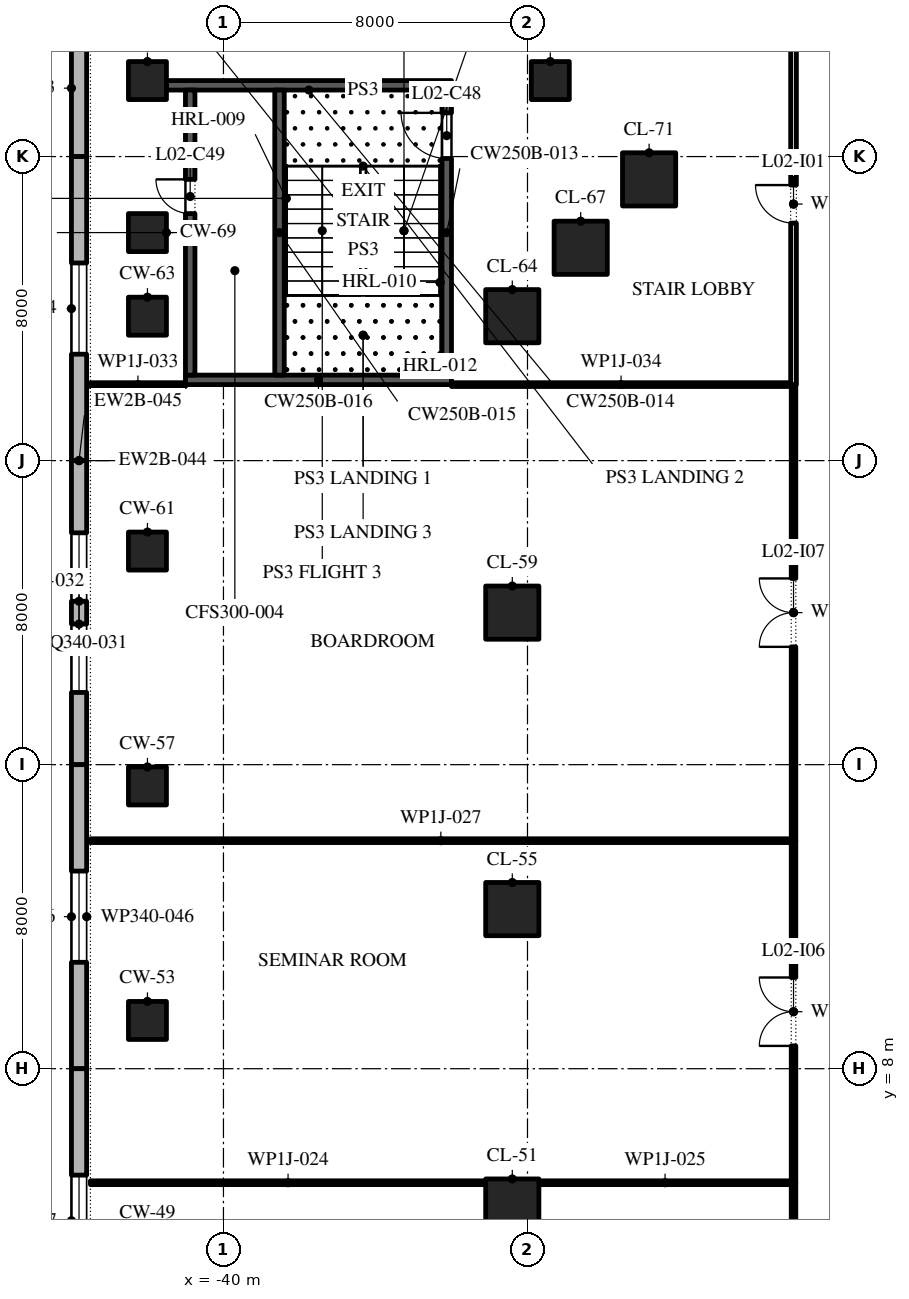
"""IFC4 building model, lengths in metres.
Left out: names, types, materials, properties, quantities, classifications, styles, units other than length and angle.
Written with IfcOpenShell. Run it as: python <this file> out.ifc"""

import sys

from ifc_helpers import new_model, si_unit, direction, frame, frame_2d, origin, origin_2d, place, context, subcontext, project, spatial, polyline, rectangle, outline, extrude, element, fill, save


model = new_model("IFC4")
c1 = context("Model", 3, precision=1e-05, world=origin(), true_north=direction((0.0, 1.0)))
c2 = subcontext(c1, "Body", "Model", "MODEL_VIEW")
j1 = project(units=[si_unit("LENGTHUNIT", "METRE"), si_unit("PLANEANGLEUNIT", "RADIAN")], contexts=[c1])
p1 = place(None, origin())
s1 = spatial("IfcSite", under=j1, at=p1, CompositionType="ELEMENT")
p2 = place(p1, origin())
s2 = spatial("IfcBuilding", under=s1, at=p2, CompositionType="ELEMENT")
p3 = place(p2, frame((0.0, 0.0, 14.0)))
s3 = spatial("IfcBuildingStorey", under=s2, at=p3, CompositionType="ELEMENT", Elevation=14.0)
p4 = place(p3, frame((-32.4, 4.4, 0.0), z_axis=(0.0, 0.0, 1.0), x_axis=(1.0, 0.0, 0.0)))
e1 = element("IfcColumn", 1, at=p4, inside=s3, PredefinedType="COLUMN", context=c2, shape_type="SweptSolid", body=[
    extrude(rectangle(XDim=1.4, YDim=1.4, at=origin_2d()), origin(), (0.0, 0.0, 1.0), 5.2),
])
p5 = place(p3, frame((-42.0, 9.27, 0.0), z_axis=(0.0, 0.0, 1.0), x_axis=(1.0, 0.0, 0.0)))
e2 = element("IfcColumn", 2, at=p5, inside=s3, PredefinedType="COLUMN", context=c2, shape_type="SweptSolid", body=[
    extrude(rectangle(XDim=1.0, YDim=1.0, at=origin_2d()), origin(), (0.0, 0.0, 1.0), 5.2),
])
p6 = place(p3, frame((-32.4, 12.2, 0.0), z_axis=(0.0, 0.0, 1.0), x_axis=(1.0, 0.0, 0.0)))
e3 = element("IfcColumn", 3, at=p6, inside=s3, PredefinedType="COLUMN", context=c2, shape_type="SweptSolid", body=[
    extrude(rectangle(XDim=1.4, YDim=1.4, at=origin_2d()), origin(), (0.0, 0.0, 1.0), 5.2),
])
p7 = place(p3, frame((-42.0, 15.44, 0.0), z_axis=(0.0, 0.0, 1.0), x_axis=(1.0, 0.0, 0.0)))
e4 = element("IfcColumn", 4, at=p7, inside=s3, PredefinedType="COLUMN", context=c2, shape_type="SweptSolid", body=[
    extrude(rectangle(XDim=1.0, YDim=1.0, at=origin_2d()), origin(), (0.0, 0.0, 1.0), 5.2),
])
p8 = place(p3, frame((-32.4, 20.0, 0.0), z_axis=(0.0, 0.0, 1.0), x_axis=(1.0, 0.0, 0.0)))
e5 = element("IfcColumn", 5, at=p8, inside=s3, PredefinedType="COLUMN", context=c2, shape_type="SweptSolid", body=[
    extrude(rectangle(XDim=1.4, YDim=1.4, at=origin_2d()), origin(), (0.0, 0.0, 1.0), 5.2),
])
for number, where, z_axis, x_axis in (
    (6, (-42.0, 21.62, 0.0), (0.0, 0.0, 1.0), (1.0, 0.0, 0.0)),
    (7, (-42.0, 27.8, 0.0), (0.0, 0.0, 1.0), (1.0, 0.0, 0.0)),
):
    element("IfcColumn", number, at=place(p3, frame(where, z_axis=z_axis, x_axis=x_axis)), inside=s3, PredefinedType="COLUMN", context=c2, shape_type="SweptSolid", body=[
        extrude(rectangle(XDim=1.0, YDim=1.0, at=origin_2d()), origin(), (0.0, 0.0, 1.0), 5.2),
    ])
for number, where, z_axis, x_axis in (
    (8, (-32.4, 27.8, 0.0), (0.0, 0.0, 1.0), (1.0, 0.0, 0.0)),
    (9, (-30.6, 29.6, 0.0), (0.0, 0.0, 1.0), (1.0, 0.0, 0.0)),
):
    element("IfcColumn", number, at=place(p3, frame(where, z_axis=z_axis, x_axis=x_axis)), inside=s3, PredefinedType="COLUMN", context=c2, shape_type="SweptSolid", body=[
        extrude(rectangle(XDim=1.4, YDim=1.4, at=origin_2d()), origin(), (0.0, 0.0, 1.0), 5.2),
    ])
p9 = place(p3, frame((-42.0, 30.0, 0.0), z_axis=(0.0, 0.0, 1.0), x_axis=(1.0, 0.0, 0.0)))
e10 = element("IfcColumn", 10, at=p9, inside=s3, PredefinedType="COLUMN", context=c2, shape_type="SweptSolid", body=[
    extrude(rectangle(XDim=1.0, YDim=1.0, at=origin_2d()), origin(), (0.0, 0.0, 1.0), 5.2),
])
p10 = place(p3, frame((-28.8, 31.4, 0.0), z_axis=(0.0, 0.0, 1.0), x_axis=(1.0, 0.0, 0.0)))
e11 = element("IfcColumn", 11, at=p10, inside=s3, PredefinedType="COLUMN", context=c2, shape_type="SweptSolid", body=[
    extrude(rectangle(XDim=1.4, YDim=1.4, at=origin_2d()), origin(), (0.0, 0.0, 1.0), 5.2),
])
for number, where, z_axis, x_axis in (
    (12, (-42.0, 34.0, 0.0), (0.0, 0.0, 1.0), (1.0, 0.0, 0.0)),
    (13, (-31.4, 34.0, 0.0), (0.0, 0.0, 1.0), (1.0, 0.0, 0.0)),
):
    element("IfcColumn", number, at=place(p3, frame(where, z_axis=z_axis, x_axis=x_axis)), inside=s3, PredefinedType="COLUMN", context=c2, shape_type="SweptSolid", body=[
        extrude(rectangle(XDim=1.0, YDim=1.0, at=origin_2d()), origin(), (0.0, 0.0, 1.0), 5.2),
    ])
p11 = place(p3, frame((-43.8, 35.6, 0.0), z_axis=(0.0, 0.0, 1.0), x_axis=(0.0, -1.0, 0.0)))
e14 = element("IfcWall", 14, at=p11, inside=s3, PredefinedType="STANDARD", context=c2, shape_type="SweptSolid", body=[
    extrude(rectangle(XDim=3.6, YDim=0.4, at=frame_2d((1.8, 0.0))), origin(), (0.0, 0.0, 1.0), 4.9),
])
p12 = place(p3, frame((-43.8, 32.0, 0.0), z_axis=(0.0, 0.0, 1.0), x_axis=(0.0, -1.0, 0.0)))
e15 = element("IfcWall", 15, at=p12, inside=s3, PredefinedType="STANDARD", context=c2, shape_type="SweptSolid", body=[
    extrude(rectangle(XDim=8.0, YDim=0.4, at=frame_2d((4.0, 0.0))), origin(), (0.0, 0.0, 1.0), 4.9),
])
p13 = place(p12, frame((2.8, 0.0, 0.9)))
e16 = element("IfcOpeningElement", 16, at=p13, cuts=e15, PredefinedType="OPENING", context=c2, shape_type="SweptSolid", body=[
    extrude(outline(polyline([(0.0, 0.0), (2.4, 0.0), (2.4, 1.7), (2.379, 1.976), (2.315, 2.246), (2.212, 2.502), (2.07, 2.74), (1.893, 2.954), (1.686, 3.137), (1.453, 3.287), (1.2, 3.4), (0.947, 3.287), (0.714, 3.137), (0.507, 2.954), (0.33, 2.74), (0.188, 2.502), (0.084, 2.246), (0.021, 1.976), (0.0, 1.7), (0.0, 0.0)])), frame((0.0, 0.21, 0.0), z_axis=(0.0, -1.0, 0.0), x_axis=(1.0, 0.0, 0.0)), (0.0, 0.0, 1.0), 0.42),
])
p14 = place(p3, frame((-43.8, 24.0, 0.0), z_axis=(0.0, 0.0, 1.0), x_axis=(0.0, -1.0, 0.0)))
e17 = element("IfcWall", 17, at=p14, inside=s3, PredefinedType="STANDARD", context=c2, shape_type="SweptSolid", body=[
    extrude(rectangle(XDim=8.0, YDim=0.4, at=frame_2d((4.0, 0.0))), origin(), (0.0, 0.0, 1.0), 4.9),
])
p15 = place(p14, frame((1.9, 0.0, 0.9)))
e18 = element("IfcOpeningElement", 18, at=p15, cuts=e17, PredefinedType="OPENING", context=c2, shape_type="SweptSolid", body=[
    extrude(outline(polyline([(0.0, 0.0), (1.8, 0.0), (1.8, 1.841), (1.785, 2.076), (1.739, 2.307), (1.663, 2.53), (1.559, 2.741), (1.428, 2.937), (1.273, 3.114), (1.096, 3.269), (0.9, 3.4), (0.704, 3.269), (0.527, 3.114), (0.372, 2.937), (0.241, 2.741), (0.137, 2.53), (0.061, 2.307), (0.015, 2.076), (0.0, 1.841), (0.0, 0.0)])), frame((0.0, 0.21, 0.0), z_axis=(0.0, -1.0, 0.0), x_axis=(1.0, 0.0, 0.0)), (0.0, 0.0, 1.0), 0.42),
])
p16 = place(p14, frame((4.3, 0.0, 0.9)))
e19 = element("IfcOpeningElement", 19, at=p16, cuts=e17, PredefinedType="OPENING", context=c2, shape_type="SweptSolid", body=[
    extrude(outline(polyline([(0.0, 0.0), (1.8, 0.0), (1.8, 1.841), (1.785, 2.076), (1.739, 2.307), (1.663, 2.53), (1.559, 2.741), (1.428, 2.937), (1.273, 3.114), (1.096, 3.269), (0.9, 3.4), (0.704, 3.269), (0.527, 3.114), (0.372, 2.937), (0.241, 2.741), (0.137, 2.53), (0.061, 2.307), (0.015, 2.076), (0.0, 1.841), (0.0, 0.0)])), frame((0.0, 0.21, 0.0), z_axis=(0.0, -1.0, 0.0), x_axis=(1.0, 0.0, 0.0)), (0.0, 0.0, 1.0), 0.42),
])
p17 = place(p3, frame((-43.8, 16.0, 0.0), z_axis=(0.0, 0.0, 1.0), x_axis=(0.0, -1.0, 0.0)))
e20 = element("IfcWall", 20, at=p17, inside=s3, PredefinedType="STANDARD", context=c2, shape_type="SweptSolid", body=[
    extrude(rectangle(XDim=8.0, YDim=0.4, at=frame_2d((4.0, 0.0))), origin(), (0.0, 0.0, 1.0), 4.9),
])
p18 = place(p17, frame((2.8, 0.0, 0.9)))
e21 = element("IfcOpeningElement", 21, at=p18, cuts=e20, PredefinedType="OPENING", context=c2, shape_type="SweptSolid", body=[
    extrude(outline(polyline([(0.0, 0.0), (2.4, 0.0), (2.4, 1.7), (2.379, 1.976), (2.315, 2.246), (2.212, 2.502), (2.07, 2.74), (1.893, 2.954), (1.686, 3.137), (1.453, 3.287), (1.2, 3.4), (0.947, 3.287), (0.714, 3.137), (0.507, 2.954), (0.33, 2.74), (0.188, 2.502), (0.084, 2.246), (0.021, 1.976), (0.0, 1.7), (0.0, 0.0)])), frame((0.0, 0.21, 0.0), z_axis=(0.0, -1.0, 0.0), x_axis=(1.0, 0.0, 0.0)), (0.0, 0.0, 1.0), 0.42),
])
p19 = place(p3, frame((-43.8, 8.0, 0.0), z_axis=(0.0, 0.0, 1.0), x_axis=(0.0, -1.0, 0.0)))
e22 = element("IfcWall", 22, at=p19, inside=s3, PredefinedType="STANDARD", context=c2, shape_type="SweptSolid", body=[
    extrude(rectangle(XDim=8.0, YDim=0.4, at=frame_2d((4.0, 0.0))), origin(), (0.0, 0.0, 1.0), 4.9),
])
p20 = place(p19, frame((2.8, 0.0, 0.9)))
e23 = element("IfcOpeningElement", 23, at=p20, cuts=e22, PredefinedType="OPENING", context=c2, shape_type="SweptSolid", body=[
    extrude(outline(polyline([(0.0, 0.0), (2.4, 0.0), (2.4, 1.7), (2.379, 1.976), (2.315, 2.246), (2.212, 2.502), (2.07, 2.74), (1.893, 2.954), (1.686, 3.137), (1.453, 3.287), (1.2, 3.4), (0.947, 3.287), (0.714, 3.137), (0.507, 2.954), (0.33, 2.74), (0.188, 2.502), (0.084, 2.246), (0.021, 1.976), (0.0, 1.7), (0.0, 0.0)])), frame((0.0, 0.21, 0.0), z_axis=(0.0, -1.0, 0.0), x_axis=(1.0, 0.0, 0.0)), (0.0, 0.0, 1.0), 0.42),
])
p21 = place(p3, frame((-41.0, 26.125, 0.0), z_axis=(0.0, 0.0, 1.0), x_axis=(1.0, 0.0, 0.0)))
e24 = element("IfcWall", 24, at=p21, inside=s3, PredefinedType="SHEAR", context=c2, shape_type="SweptSolid", body=[
    extrude(rectangle(XDim=7.0, YDim=0.25, at=frame_2d((3.5, 0.0))), origin(), (0.0, 0.0, 1.0), 4.9),
])
p22 = place(p3, frame((-41.5, 33.875, 0.0), z_axis=(0.0, 0.0, 1.0), x_axis=(1.0, 0.0, 0.0)))
e25 = element("IfcWall", 25, at=p22, inside=s3, PredefinedType="SHEAR", context=c2, shape_type="SweptSolid", body=[
    extrude(rectangle(XDim=7.5, YDim=0.25, at=frame_2d((3.75, 0.0))), origin(), (0.0, 0.0, 1.0), 4.9),
])
p23 = place(p3, frame((-40.875, 26.25, 0.0), z_axis=(0.0, 0.0, 1.0), x_axis=(0.0, 1.0, 0.0)))
e26 = element("IfcWall", 26, at=p23, inside=s3, PredefinedType="SHEAR", context=c2, shape_type="SweptSolid", body=[
    extrude(rectangle(XDim=7.5, YDim=0.25, at=frame_2d((3.75, 0.0))), origin(), (0.0, 0.0, 1.0), 4.9),
])
p24 = place(p23, frame((4.25, 0.0, 0.0)))
e27 = element("IfcOpeningElement", 27, at=p24, cuts=e26, PredefinedType="OPENING", context=c2, shape_type="SweptSolid", body=[
    extrude(rectangle(XDim=0.9, YDim=2.1, at=frame_2d((0.45, 1.05))), frame((0.0, 0.135, 0.0), z_axis=(0.0, -1.0, 0.0), x_axis=(1.0, 0.0, 0.0)), (0.0, 0.0, 1.0), 0.27),
])
p25 = place(p3, frame((-34.125, 26.25, 0.0), z_axis=(0.0, 0.0, 1.0), x_axis=(0.0, 1.0, 0.0)))
e28 = element("IfcWall", 28, at=p25, inside=s3, PredefinedType="SHEAR", context=c2, shape_type="SweptSolid", body=[
    extrude(rectangle(XDim=7.5, YDim=0.25, at=frame_2d((3.75, 0.0))), origin(), (0.0, 0.0, 1.0), 4.9),
])
p26 = place(p25, frame((5.7, 0.0, 0.0)))
e29 = element("IfcOpeningElement", 29, at=p26, cuts=e28, PredefinedType="OPENING", context=c2, shape_type="SweptSolid", body=[
    extrude(rectangle(XDim=1.2, YDim=2.1, at=frame_2d((0.6, 1.05))), frame((0.0, 0.135, 0.0), z_axis=(0.0, -1.0, 0.0), x_axis=(1.0, 0.0, 0.0)), (0.0, 0.0, 1.0), 0.27),
])
p27 = place(p3, frame((-38.525, 26.25, 0.0), z_axis=(0.0, 0.0, 1.0), x_axis=(0.0, 1.0, 0.0)))
e30 = element("IfcWall", 30, at=p27, inside=s3, PredefinedType="SHEAR", context=c2, shape_type="SweptSolid", body=[
    extrude(rectangle(XDim=7.5, YDim=0.25, at=frame_2d((3.75, 0.0))), origin(), (0.0, 0.0, 1.0), 4.9),
])
p28 = place(p3, frame((-43.5, 5.0, 0.0), z_axis=(0.0, 0.0, 1.0), x_axis=(1.0, 0.0, 0.0)))
e31 = element("IfcWall", 31, at=p28, inside=s3, PredefinedType="PARTITIONING", context=c2, shape_type="SweptSolid", body=[
    extrude(rectangle(XDim=10.4, YDim=0.1, at=frame_2d((5.2, 0.0))), origin(), (0.0, 0.0, 1.0), 4.9),
])
p29 = place(p3, frame((-31.7, 5.0, 0.0), z_axis=(0.0, 0.0, 1.0), x_axis=(1.0, 0.0, 0.0)))
e32 = element("IfcWall", 32, at=p29, inside=s3, PredefinedType="PARTITIONING", context=c2, shape_type="SweptSolid", body=[
    extrude(rectangle(XDim=6.64, YDim=0.1, at=frame_2d((3.32, 0.0))), origin(), (0.0, 0.0, 1.0), 4.9),
])
p30 = place(p3, frame((-43.5, 14.0, 0.0), z_axis=(0.0, 0.0, 1.0), x_axis=(1.0, 0.0, 0.0)))
e33 = element("IfcWall", 33, at=p30, inside=s3, PredefinedType="PARTITIONING", context=c2, shape_type="SweptSolid", body=[
    extrude(rectangle(XDim=18.44, YDim=0.1, at=frame_2d((9.22, 0.0))), origin(), (0.0, 0.0, 1.0), 4.9),
])
p31 = place(p3, frame((-43.5, 26.0, 0.0), z_axis=(0.0, 0.0, 1.0), x_axis=(1.0, 0.0, 0.0)))
e34 = element("IfcWall", 34, at=p31, inside=s3, PredefinedType="PARTITIONING", context=c2, shape_type="SweptSolid", body=[
    extrude(rectangle(XDim=2.5, YDim=0.1, at=frame_2d((1.25, 0.0))), origin(), (0.0, 0.0, 1.0), 4.9),
])
p32 = place(p3, frame((-34.0, 26.0, 0.0), z_axis=(0.0, 0.0, 1.0), x_axis=(1.0, 0.0, 0.0)))
e35 = element("IfcWall", 35, at=p32, inside=s3, PredefinedType="PARTITIONING", context=c2, shape_type="SweptSolid", body=[
    extrude(rectangle(XDim=8.925, YDim=0.1, at=frame_2d((4.462, 0.0))), origin(), (0.0, 0.0, 1.0), 4.9),
])
p33 = place(p3, frame((-25.0, -6.0, 0.0), z_axis=(0.0, 0.0, 1.0), x_axis=(0.0, 1.0, 0.0)))
e36 = element("IfcWall", 36, at=p33, inside=s3, PredefinedType="PARTITIONING", context=c2, shape_type="SweptSolid", body=[
    extrude(rectangle(XDim=11.0, YDim=0.12, at=frame_2d((5.5, 0.0))), origin(), (0.0, 0.0, 1.0), 4.9),
])
p34 = place(p33, frame((4.6, 0.0, 0.0)))
e37 = element("IfcOpeningElement", 37, at=p34, cuts=e36, PredefinedType="OPENING", context=c2, shape_type="SweptSolid", body=[
    extrude(rectangle(XDim=1.8, YDim=2.1, at=frame_2d((0.9, 1.05))), frame((0.0, 0.07, 0.0), z_axis=(0.0, -1.0, 0.0), x_axis=(1.0, 0.0, 0.0)), (0.0, 0.0, 1.0), 0.14),
])
p35 = place(p3, frame((-25.0, 5.0, 0.0), z_axis=(0.0, 0.0, 1.0), x_axis=(0.0, 1.0, 0.0)))
e38 = element("IfcWall", 38, at=p35, inside=s3, PredefinedType="PARTITIONING", context=c2, shape_type="SweptSolid", body=[
    extrude(rectangle(XDim=9.0, YDim=0.12, at=frame_2d((4.5, 0.0))), origin(), (0.0, 0.0, 1.0), 4.9),
])
p36 = place(p35, frame((3.6, 0.0, 0.0)))
e39 = element("IfcOpeningElement", 39, at=p36, cuts=e38, PredefinedType="OPENING", context=c2, shape_type="SweptSolid", body=[
    extrude(rectangle(XDim=1.8, YDim=2.1, at=frame_2d((0.9, 1.05))), frame((0.0, 0.07, 0.0), z_axis=(0.0, -1.0, 0.0), x_axis=(1.0, 0.0, 0.0)), (0.0, 0.0, 1.0), 0.14),
])
p37 = place(p3, frame((-25.0, 14.0, 0.0), z_axis=(0.0, 0.0, 1.0), x_axis=(0.0, 1.0, 0.0)))
e40 = element("IfcWall", 40, at=p37, inside=s3, PredefinedType="PARTITIONING", context=c2, shape_type="SweptSolid", body=[
    extrude(rectangle(XDim=12.0, YDim=0.12, at=frame_2d((6.0, 0.0))), origin(), (0.0, 0.0, 1.0), 4.9),
])
p38 = place(p37, frame((5.1, 0.0, 0.0)))
e41 = element("IfcOpeningElement", 41, at=p38, cuts=e40, PredefinedType="OPENING", context=c2, shape_type="SweptSolid", body=[
    extrude(rectangle(XDim=1.8, YDim=2.1, at=frame_2d((0.9, 1.05))), frame((0.0, 0.07, 0.0), z_axis=(0.0, -1.0, 0.0), x_axis=(1.0, 0.0, 0.0)), (0.0, 0.0, 1.0), 0.14),
])
p39 = place(p3, frame((-25.0, 26.0, 0.0), z_axis=(0.0, 0.0, 1.0), x_axis=(0.0, 1.0, 0.0)))
e42 = element("IfcWall", 42, at=p39, inside=s3, PredefinedType="PARTITIONING", context=c2, shape_type="SweptSolid", body=[
    extrude(rectangle(XDim=9.5, YDim=0.15, at=frame_2d((4.75, 0.0))), origin(), (0.0, 0.0, 1.0), 4.9),
])
p40 = place(p39, frame((4.25, 0.0, 0.0)))
e43 = element("IfcOpeningElement", 43, at=p40, cuts=e42, PredefinedType="OPENING", context=c2, shape_type="SweptSolid", body=[
    extrude(rectangle(XDim=1.0, YDim=2.1, at=frame_2d((0.5, 1.05))), frame((0.0, 0.085, 0.0), z_axis=(0.0, -1.0, 0.0), x_axis=(1.0, 0.0, 0.0)), (0.0, 0.0, 1.0), 0.17),
])
p41 = place(p13, origin())
e44 = element("IfcWindow", 44, at=p41, inside=s3, PartitioningType="DOUBLE_PANEL_VERTICAL", PredefinedType="WINDOW", context=c2, shape_type="SweptSolid", body=[
    extrude(outline(polyline([(0.0, 0.0), (2.4, 0.0), (2.4, 1.7), (2.379, 1.976), (2.315, 2.246), (2.212, 2.502), (2.07, 2.74), (1.893, 2.954), (1.686, 3.137), (1.453, 3.287), (1.2, 3.4), (0.947, 3.287), (0.714, 3.137), (0.507, 2.954), (0.33, 2.74), (0.188, 2.502), (0.084, 2.246), (0.021, 1.976), (0.0, 1.7), (0.0, 0.0)])), frame((0.0, 0.03, 0.0), z_axis=(0.0, -1.0, 0.0), x_axis=(1.0, 0.0, 0.0)), (0.0, 0.0, 1.0), 0.06),
])
fill(e16, e44)
p42 = place(p15, origin())
e45 = element("IfcWindow", 45, at=p42, inside=s3, PartitioningType="DOUBLE_PANEL_VERTICAL", PredefinedType="WINDOW", context=c2, shape_type="SweptSolid", body=[
    extrude(outline(polyline([(0.0, 0.0), (1.8, 0.0), (1.8, 1.841), (1.785, 2.076), (1.739, 2.307), (1.663, 2.53), (1.559, 2.741), (1.428, 2.937), (1.273, 3.114), (1.096, 3.269), (0.9, 3.4), (0.704, 3.269), (0.527, 3.114), (0.372, 2.937), (0.241, 2.741), (0.137, 2.53), (0.061, 2.307), (0.015, 2.076), (0.0, 1.841), (0.0, 0.0)])), frame((0.0, 0.03, 0.0), z_axis=(0.0, -1.0, 0.0), x_axis=(1.0, 0.0, 0.0)), (0.0, 0.0, 1.0), 0.06),
])
fill(e18, e45)
p43 = place(p16, origin())
e46 = element("IfcWindow", 46, at=p43, inside=s3, PartitioningType="DOUBLE_PANEL_VERTICAL", PredefinedType="WINDOW", context=c2, shape_type="SweptSolid", body=[
    extrude(outline(polyline([(0.0, 0.0), (1.8, 0.0), (1.8, 1.841), (1.785, 2.076), (1.739, 2.307), (1.663, 2.53), (1.559, 2.741), (1.428, 2.937), (1.273, 3.114), (1.096, 3.269), (0.9, 3.4), (0.704, 3.269), (0.527, 3.114), (0.372, 2.937), (0.241, 2.741), (0.137, 2.53), (0.061, 2.307), (0.015, 2.076), (0.0, 1.841), (0.0, 0.0)])), frame((0.0, 0.03, 0.0), z_axis=(0.0, -1.0, 0.0), x_axis=(1.0, 0.0, 0.0)), (0.0, 0.0, 1.0), 0.06),
])
fill(e19, e46)
p44 = place(p18, origin())
e47 = element("IfcWindow", 47, at=p44, inside=s3, PartitioningType="DOUBLE_PANEL_VERTICAL", PredefinedType="WINDOW", context=c2, shape_type="SweptSolid", body=[
    extrude(outline(polyline([(0.0, 0.0), (2.4, 0.0), (2.4, 1.7), (2.379, 1.976), (2.315, 2.246), (2.212, 2.502), (2.07, 2.74), (1.893, 2.954), (1.686, 3.137), (1.453, 3.287), (1.2, 3.4), (0.947, 3.287), (0.714, 3.137), (0.507, 2.954), (0.33, 2.74), (0.188, 2.502), (0.084, 2.246), (0.021, 1.976), (0.0, 1.7), (0.0, 0.0)])), frame((0.0, 0.03, 0.0), z_axis=(0.0, -1.0, 0.0), x_axis=(1.0, 0.0, 0.0)), (0.0, 0.0, 1.0), 0.06),
])
fill(e21, e47)
p45 = place(p20, origin())
e48 = element("IfcWindow", 48, at=p45, inside=s3, PartitioningType="DOUBLE_PANEL_VERTICAL", PredefinedType="WINDOW", context=c2, shape_type="SweptSolid", body=[
    extrude(outline(polyline([(0.0, 0.0), (2.4, 0.0), (2.4, 1.7), (2.379, 1.976), (2.315, 2.246), (2.212, 2.502), (2.07, 2.74), (1.893, 2.954), (1.686, 3.137), (1.453, 3.287), (1.2, 3.4), (0.947, 3.287), (0.714, 3.137), (0.507, 2.954), (0.33, 2.74), (0.188, 2.502), (0.084, 2.246), (0.021, 1.976), (0.0, 1.7), (0.0, 0.0)])), frame((0.0, 0.03, 0.0), z_axis=(0.0, -1.0, 0.0), x_axis=(1.0, 0.0, 0.0)), (0.0, 0.0, 1.0), 0.06),
])
fill(e23, e48)
p46 = place(p26, origin())
e49 = element("IfcDoor", 49, at=p46, inside=s3, OperationType="SINGLE_SWING_LEFT", PredefinedType="DOOR", context=c2, shape_type="SweptSolid", body=[
    extrude(rectangle(XDim=1.2, YDim=2.1, at=frame_2d((0.6, 1.05))), frame((0.0, 0.025, 0.0), z_axis=(0.0, -1.0, 0.0), x_axis=(1.0, 0.0, 0.0)), (0.0, 0.0, 1.0), 0.05),
])
fill(e29, e49)
p47 = place(p24, origin())
e50 = element("IfcDoor", 50, at=p47, inside=s3, OperationType="SINGLE_SWING_LEFT", PredefinedType="DOOR", context=c2, shape_type="SweptSolid", body=[
    extrude(rectangle(XDim=0.9, YDim=2.1, at=frame_2d((0.45, 1.05))), frame((0.0, -0.075, 0.0), z_axis=(0.0, -1.0, 0.0), x_axis=(1.0, 0.0, 0.0)), (0.0, 0.0, 1.0), 0.05),
])
fill(e27, e50)
p48 = place(p40, origin())
e51 = element("IfcDoor", 51, at=p48, inside=s3, OperationType="SINGLE_SWING_LEFT", PredefinedType="DOOR", context=c2, shape_type="SweptSolid", body=[
    extrude(rectangle(XDim=1.0, YDim=2.1, at=frame_2d((0.5, 1.05))), frame((0.0, 0.025, 0.0), z_axis=(0.0, -1.0, 0.0), x_axis=(1.0, 0.0, 0.0)), (0.0, 0.0, 1.0), 0.05),
])
fill(e43, e51)
p49 = place(p36, origin())
e52 = element("IfcDoor", 52, at=p49, inside=s3, OperationType="SINGLE_SWING_RIGHT", PredefinedType="DOOR", context=c2, shape_type="SweptSolid", body=[
    extrude(rectangle(XDim=1.8, YDim=2.1, at=frame_2d((0.9, 1.05))), frame((0.0, 0.025, 0.0), z_axis=(0.0, -1.0, 0.0), x_axis=(1.0, 0.0, 0.0)), (0.0, 0.0, 1.0), 0.05),
])
fill(e39, e52)
p50 = place(p38, origin())
e53 = element("IfcDoor", 53, at=p50, inside=s3, OperationType="SINGLE_SWING_RIGHT", PredefinedType="DOOR", context=c2, shape_type="SweptSolid", body=[
    extrude(rectangle(XDim=1.8, YDim=2.1, at=frame_2d((0.9, 1.05))), frame((0.0, 0.025, 0.0), z_axis=(0.0, -1.0, 0.0), x_axis=(1.0, 0.0, 0.0)), (0.0, 0.0, 1.0), 0.05),
])
fill(e41, e53)
save(model, sys.argv[1])
